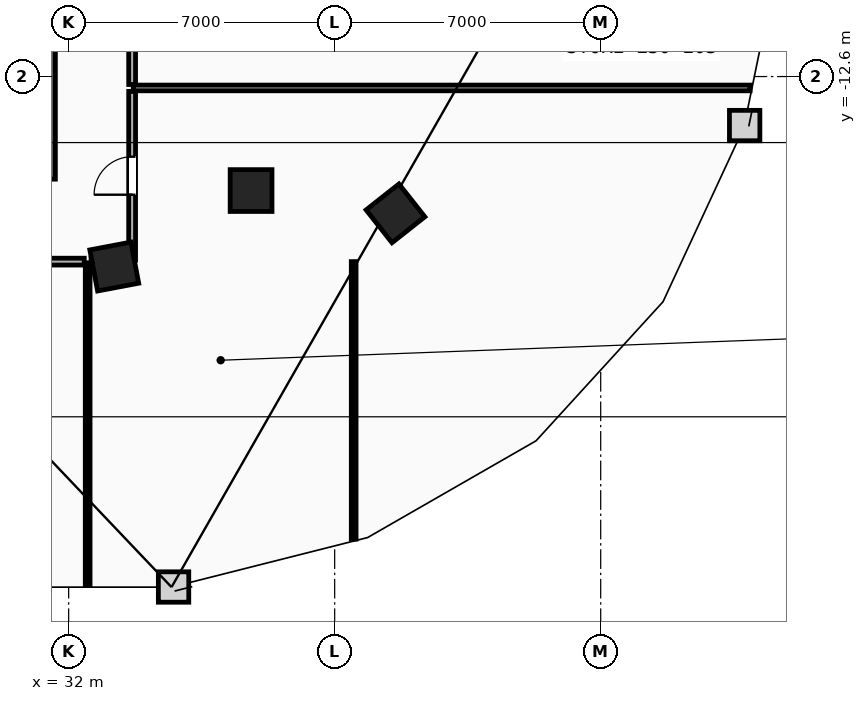
"""IFC4 building model, lengths in metres.
Left out: names, types, materials, properties, quantities, classifications, styles, units other than length and angle.
Written with IfcOpenShell. Run it as: python <this file> out.ifc"""

import sys

from ifc_helpers import new_model, si_unit, direction, frame, frame_2d, origin, origin_2d, place, context, subcontext, project, spatial, rectangle, extrude, element, fill, save


model = new_model("IFC4")
c1 = context("Model", 3, precision=1e-05, world=origin(), true_north=direction((0.0, 1.0)))
c2 = subcontext(c1, "Body", "Model", "MODEL_VIEW")
j1 = project(units=[si_unit("LENGTHUNIT", "METRE"), si_unit("PLANEANGLEUNIT", "RADIAN")], contexts=[c1])
p1 = place(None, origin())
s1 = spatial("IfcSite", under=j1, at=p1, CompositionType="ELEMENT")
p2 = place(p1, origin())
s2 = spatial("IfcBuilding", under=s1, at=p2, CompositionType="ELEMENT")
p3 = place(p2, frame((0.0, 0.0, 117.8)))
s3 = spatial("IfcBuildingStorey", under=s2, at=p3, CompositionType="ELEMENT", Elevation=117.8)
for number, where, z_axis, x_axis in (
    (1, (36.8, -15.6, 0.0), (0.0, 0.0, 1.0), (1.0, 0.0, 0.0)),
    (2, (33.2, -17.6, 0.0), (0.0, 0.0, 1.0), (0.983, 0.186, 0.0)),
    (3, (40.6, -16.2, 0.0), (0.0, 0.0, 1.0), (0.785, 0.619, 0.0)),
):
    element("IfcColumn", number, at=place(p3, frame(where, z_axis=z_axis, x_axis=x_axis)), inside=s3, PredefinedType="COLUMN", context=c2, shape_type="SweptSolid", body=[
        extrude(rectangle(XDim=1.1, YDim=1.1, at=origin_2d()), origin(), (0.0, 0.0, 1.0), 3.6),
    ])
p4 = place(p3, frame((31.275, -15.3, 0.0), z_axis=(0.0, 0.0, 1.0), x_axis=(0.0, 1.0, 0.0)))
e4 = element("IfcWall", 4, at=p4, inside=s3, PredefinedType="SHEAR", context=c2, shape_type="SweptSolid", body=[
    extrude(rectangle(XDim=13.33, YDim=0.75, at=frame_2d((6.665, 0.0))), origin(), (0.0, 0.0, 1.0), 3.3),
])
p5 = place(p3, frame((33.7, -12.9, 0.0), z_axis=(0.0, 0.0, 1.0), x_axis=(1.0, 0.0, 0.0)))
e5 = element("IfcWall", 5, at=p5, inside=s3, PredefinedType="PARTITIONING", context=c2, shape_type="SweptSolid", body=[
    extrude(rectangle(XDim=16.231, YDim=0.15, at=frame_2d((8.115, 0.0))), origin(), (0.0, 0.0, 1.0), 3.3),
])
p6 = place(p3, frame((32.5, -25.985, 0.0), z_axis=(0.0, 0.0, 1.0), x_axis=(0.0, 1.0, 0.0)))
e6 = element("IfcWall", 6, at=p6, inside=s3, PredefinedType="PARTITIONING", context=c2, shape_type="SweptSolid", body=[
    extrude(rectangle(XDim=8.485, YDim=0.125, at=frame_2d((4.243, 0.0))), origin(), (0.0, 0.0, 1.0), 3.3),
])
p7 = place(p3, frame((39.5, -24.772, 0.0), z_axis=(0.0, 0.0, 1.0), x_axis=(0.0, 1.0, 0.0)))
e7 = element("IfcWall", 7, at=p7, inside=s3, PredefinedType="PARTITIONING", context=c2, shape_type="SweptSolid", body=[
    extrude(rectangle(XDim=7.302, YDim=0.125, at=frame_2d((3.651, 0.0))), origin(), (0.0, 0.0, 1.0), 3.3),
])
p8 = place(p3, frame((24.59, -17.47, 0.0), z_axis=(0.0, 0.0, 1.0), x_axis=(1.0, 0.0, 0.0)))
e8 = element("IfcWall", 8, at=p8, inside=s3, PredefinedType="PARTITIONING", context=c2, shape_type="SweptSolid", body=[
    extrude(rectangle(XDim=7.82, YDim=0.18, at=frame_2d((3.91, 0.0))), origin(), (0.0, 0.0, 1.0), 3.3),
])
p9 = place(p8, frame((3.41, 0.0, 0.0)))
e9 = element("IfcOpeningElement", 9, at=p9, cuts=e8, PredefinedType="OPENING", context=c2, shape_type="SweptSolid", body=[
    extrude(rectangle(XDim=1.0, YDim=2.15, at=frame_2d((0.5, 1.075))), frame((0.0, 0.1, 0.0), z_axis=(0.0, -1.0, 0.0), x_axis=(1.0, 0.0, 0.0)), (0.0, 0.0, 1.0), 0.2),
])
p10 = place(p3, frame((33.67, -17.428, 0.0), z_axis=(0.0, 0.0, 1.0), x_axis=(0.0, 1.0, 0.0)))
e10 = element("IfcWall", 10, at=p10, inside=s3, PredefinedType="PARTITIONING", context=c2, shape_type="SweptSolid", body=[
    extrude(rectangle(XDim=4.438, YDim=0.18, at=frame_2d((2.219, 0.0))), origin(), (0.0, 0.0, 1.0), 3.3),
])
p11 = place(p10, frame((1.719, 0.0, 0.0)))
e11 = element("IfcOpeningElement", 11, at=p11, cuts=e10, PredefinedType="OPENING", context=c2, shape_type="SweptSolid", body=[
    extrude(rectangle(XDim=1.0, YDim=2.15, at=frame_2d((0.5, 1.075))), frame((0.0, 0.1, 0.0), z_axis=(0.0, -1.0, 0.0), x_axis=(1.0, 0.0, 0.0)), (0.0, 0.0, 1.0), 0.2),
])
p12 = place(p3, frame((32.59, -17.47, 0.0), z_axis=(0.0, 0.0, 1.0), x_axis=(1.0, 0.0, 0.0)))
e12 = element("IfcWall", 12, at=p12, inside=s3, PredefinedType="PARTITIONING", context=c2, shape_type="SweptSolid", body=[
    extrude(rectangle(XDim=1.038, YDim=0.18, at=frame_2d((0.519, 0.0))), origin(), (0.0, 0.0, 1.0), 3.3),
])
p13 = place(p3, frame((33.67, -12.81, 0.0), z_axis=(0.0, 0.0, 1.0), x_axis=(0.0, 1.0, 0.0)))
e13 = element("IfcWall", 13, at=p13, inside=s3, PredefinedType="PARTITIONING", context=c2, shape_type="SweptSolid", body=[
    extrude(rectangle(XDim=3.459, YDim=0.18, at=frame_2d((1.729, 0.0))), origin(), (0.0, 0.0, 1.0), 3.3),
])
p14 = place(p13, frame((1.229, 0.0, 0.0)))
e14 = element("IfcOpeningElement", 14, at=p14, cuts=e13, PredefinedType="OPENING", context=c2, shape_type="SweptSolid", body=[
    extrude(rectangle(XDim=1.0, YDim=2.15, at=frame_2d((0.5, 1.075))), frame((0.0, 0.1, 0.0), z_axis=(0.0, -1.0, 0.0), x_axis=(1.0, 0.0, 0.0)), (0.0, 0.0, 1.0), 0.2),
])
p15 = place(p11, origin())
e15 = element("IfcDoor", 15, at=p15, inside=s3, OperationType="SINGLE_SWING_LEFT", PredefinedType="DOOR", context=c2, shape_type="SweptSolid", body=[
    extrude(rectangle(XDim=1.0, YDim=2.15, at=frame_2d((0.5, 1.075))), frame((0.0, 0.025, 0.0), z_axis=(0.0, -1.0, 0.0), x_axis=(1.0, 0.0, 0.0)), (0.0, 0.0, 1.0), 0.05),
])
fill(e11, e15)
save(model, sys.argv[1])
